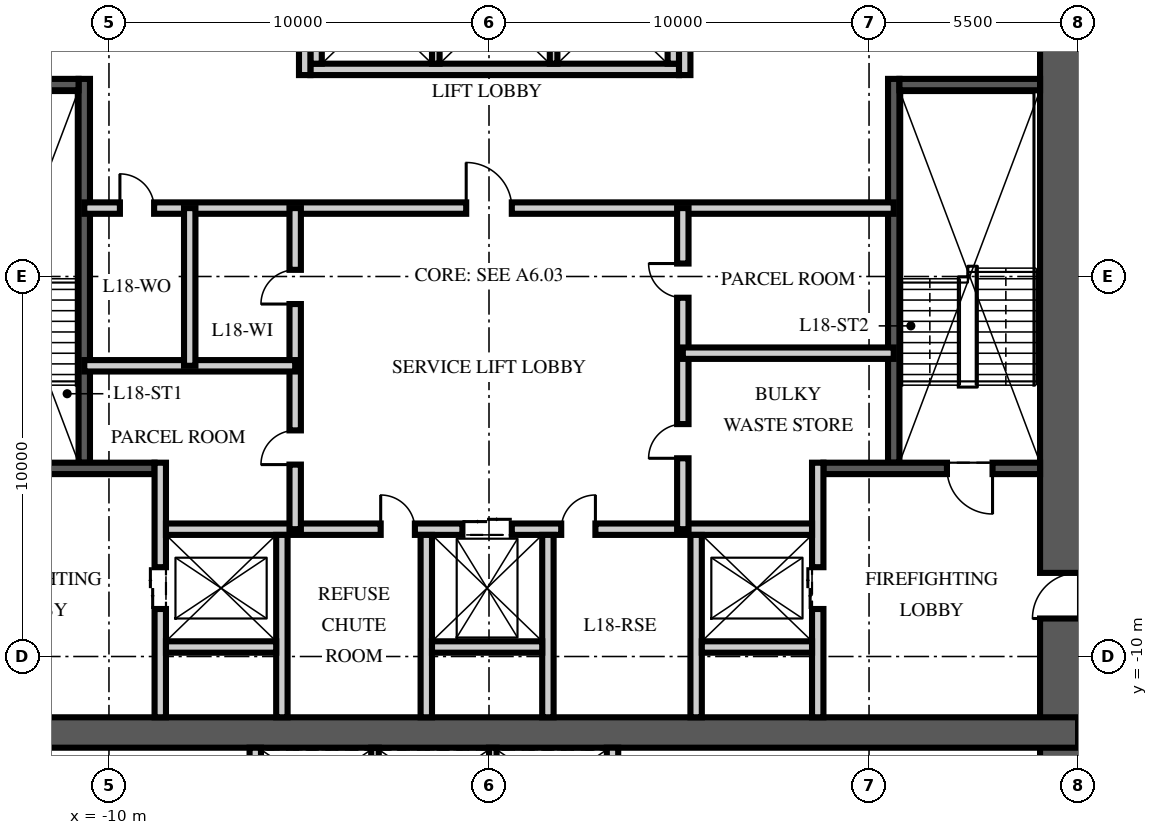
"""IFC4 building model, lengths in metres.
Left out: names, types, materials, properties, quantities, classifications, styles, units other than length and angle.
Written with IfcOpenShell. Run it as: python <this file> out.ifc"""

import sys

from ifc_helpers import new_model, si_unit, direction, frame, frame_2d, origin, place, context, subcontext, project, spatial, rectangle, extrude, element, fill, save


model = new_model("IFC4")
c1 = context("Model", 3, precision=1e-05, world=origin(), true_north=direction((0.0, 1.0)))
c2 = subcontext(c1, "Body", "Model", "MODEL_VIEW")
j1 = project(units=[si_unit("LENGTHUNIT", "METRE"), si_unit("PLANEANGLEUNIT", "RADIAN")], contexts=[c1])
p1 = place(None, origin())
s1 = spatial("IfcSite", under=j1, at=p1, CompositionType="ELEMENT")
p2 = place(p1, origin())
s2 = spatial("IfcBuilding", under=s1, at=p2, CompositionType="ELEMENT")
p3 = place(p2, frame((0.0, 0.0, 73.5)))
s3 = spatial("IfcBuildingStorey", under=s2, at=p3, CompositionType="ELEMENT", Elevation=73.5)
p4 = place(p3, frame((15.5, -15.5, -0.25), z_axis=(0.0, 0.0, 1.0), x_axis=(0.0, 1.0, 0.0)))
e1 = element("IfcWall", 1, at=p4, inside=s3, PredefinedType="SHEAR", context=c2, shape_type="SweptSolid", body=[
    extrude(rectangle(XDim=31.0, YDim=2.0, at=frame_2d((15.5, 0.0))), origin(), (0.0, 0.0, 1.0), 3.75),
])
p5 = place(p4, frame((6.5, 0.0, 0.25)))
e2 = element("IfcOpeningElement", 2, at=p5, cuts=e1, PredefinedType="OPENING", context=c2, shape_type="SweptSolid", body=[
    extrude(rectangle(XDim=1.2, YDim=2.1, at=frame_2d((0.6, 1.05))), frame((0.0, 1.01, 0.0), z_axis=(0.0, -1.0, 0.0), x_axis=(1.0, 0.0, 0.0)), (0.0, 0.0, 1.0), 2.02),
])
p6 = place(p4, frame((23.0, 0.0, 0.25)))
e3 = element("IfcOpeningElement", 3, at=p6, cuts=e1, PredefinedType="OPENING", context=c2, shape_type="SweptSolid", body=[
    extrude(rectangle(XDim=1.8, YDim=2.1, at=frame_2d((0.9, 1.05))), frame((0.0, 1.01, 0.0), z_axis=(0.0, -1.0, 0.0), x_axis=(1.0, 0.0, 0.0)), (0.0, 0.0, 1.0), 2.02),
])
p7 = place(p3, frame((-15.5, -12.0, -0.25), z_axis=(0.0, 0.0, 1.0), x_axis=(1.0, 0.0, 0.0)))
e4 = element("IfcWall", 4, at=p7, inside=s3, PredefinedType="SHEAR", context=c2, shape_type="SweptSolid", body=[
    extrude(rectangle(XDim=31.0, YDim=0.8, at=frame_2d((15.5, 0.0))), origin(), (0.0, 0.0, 1.0), 3.75),
])
p8 = place(p3, frame((-10.65, -4.9, 0.0), z_axis=(0.0, 0.0, 1.0), x_axis=(0.0, 1.0, 0.0)))
e5 = element("IfcWall", 5, at=p8, inside=s3, PredefinedType="SOLIDWALL", context=c2, shape_type="SweptSolid", body=[
    extrude(rectangle(XDim=10.1, YDim=0.3, at=frame_2d((5.05, 0.0))), origin(), (0.0, 0.0, 1.0), 3.5),
])
p9 = place(p3, frame((-14.5, -5.05, 0.0), z_axis=(0.0, 0.0, 1.0), x_axis=(1.0, 0.0, 0.0)))
e6 = element("IfcWall", 6, at=p9, inside=s3, PredefinedType="SOLIDWALL", context=c2, shape_type="SweptSolid", body=[
    extrude(rectangle(XDim=5.7, YDim=0.3, at=frame_2d((2.85, 0.0))), origin(), (0.0, 0.0, 1.0), 3.5),
])
p10 = place(p9, frame((1.25, 0.0, 0.0)))
e7 = element("IfcOpeningElement", 7, at=p10, cuts=e6, PredefinedType="OPENING", context=c2, shape_type="SweptSolid", body=[
    extrude(rectangle(XDim=1.2, YDim=2.1, at=frame_2d((0.6, 1.05))), frame((0.0, 0.16, 0.0), z_axis=(0.0, -1.0, 0.0), x_axis=(1.0, 0.0, 0.0)), (0.0, 0.0, 1.0), 0.32),
])
p11 = place(p3, frame((-14.5, 5.05, 0.0), z_axis=(0.0, 0.0, 1.0), x_axis=(1.0, 0.0, 0.0)))
e8 = element("IfcWall", 8, at=p11, inside=s3, PredefinedType="SOLIDWALL", context=c2, shape_type="SweptSolid", body=[
    extrude(rectangle(XDim=3.7, YDim=0.3, at=frame_2d((1.85, 0.0))), origin(), (0.0, 0.0, 1.0), 3.5),
])
p12 = place(p3, frame((-8.65, -11.6, 0.0), z_axis=(0.0, 0.0, 1.0), x_axis=(0.0, 1.0, 0.0)))
e9 = element("IfcWall", 9, at=p12, inside=s3, PredefinedType="PARTITIONING", context=c2, shape_type="SweptSolid", body=[
    extrude(rectangle(XDim=6.7, YDim=0.3, at=frame_2d((3.35, 0.0))), origin(), (0.0, 0.0, 1.0), 3.5),
])
p13 = place(p12, frame((2.85, 0.0, 0.0)))
e10 = element("IfcOpeningElement", 10, at=p13, cuts=e9, PredefinedType="OPENING", context=c2, shape_type="SweptSolid", body=[
    extrude(rectangle(XDim=1.1, YDim=2.1, at=frame_2d((0.55, 1.05))), frame((0.0, 0.16, 0.0), z_axis=(0.0, -1.0, 0.0), x_axis=(1.0, 0.0, 0.0)), (0.0, 0.0, 1.0), 0.32),
])
p14 = place(p3, frame((10.65, -4.9, 0.0), z_axis=(0.0, 0.0, 1.0), x_axis=(0.0, 1.0, 0.0)))
e11 = element("IfcWall", 11, at=p14, inside=s3, PredefinedType="SOLIDWALL", context=c2, shape_type="SweptSolid", body=[
    extrude(rectangle(XDim=10.1, YDim=0.3, at=frame_2d((5.05, 0.0))), origin(), (0.0, 0.0, 1.0), 3.5),
])
p15 = place(p3, frame((14.5, -5.05, 0.0), z_axis=(0.0, 0.0, 1.0), x_axis=(-1.0, 0.0, 0.0)))
e12 = element("IfcWall", 12, at=p15, inside=s3, PredefinedType="SOLIDWALL", context=c2, shape_type="SweptSolid", body=[
    extrude(rectangle(XDim=5.7, YDim=0.3, at=frame_2d((2.85, 0.0))), origin(), (0.0, 0.0, 1.0), 3.5),
])
p16 = place(p15, frame((1.25, 0.0, 0.0)))
e13 = element("IfcOpeningElement", 13, at=p16, cuts=e12, PredefinedType="OPENING", context=c2, shape_type="SweptSolid", body=[
    extrude(rectangle(XDim=1.2, YDim=2.1, at=frame_2d((0.6, 1.05))), frame((0.0, 0.16, 0.0), z_axis=(0.0, -1.0, 0.0), x_axis=(1.0, 0.0, 0.0)), (0.0, 0.0, 1.0), 0.32),
])
p17 = place(p3, frame((14.5, 5.05, 0.0), z_axis=(0.0, 0.0, 1.0), x_axis=(-1.0, 0.0, 0.0)))
e14 = element("IfcWall", 14, at=p17, inside=s3, PredefinedType="SOLIDWALL", context=c2, shape_type="SweptSolid", body=[
    extrude(rectangle(XDim=3.7, YDim=0.3, at=frame_2d((1.85, 0.0))), origin(), (0.0, 0.0, 1.0), 3.5),
])
p18 = place(p3, frame((8.65, -11.6, 0.0), z_axis=(0.0, 0.0, 1.0), x_axis=(0.0, 1.0, 0.0)))
e15 = element("IfcWall", 15, at=p18, inside=s3, PredefinedType="PARTITIONING", context=c2, shape_type="SweptSolid", body=[
    extrude(rectangle(XDim=6.7, YDim=0.3, at=frame_2d((3.35, 0.0))), origin(), (0.0, 0.0, 1.0), 3.5),
])
p19 = place(p18, frame((2.85, 0.0, 0.0)))
e16 = element("IfcOpeningElement", 16, at=p19, cuts=e15, PredefinedType="OPENING", context=c2, shape_type="SweptSolid", body=[
    extrude(rectangle(XDim=1.1, YDim=2.1, at=frame_2d((0.55, 1.05))), frame((0.0, 0.16, 0.0), z_axis=(0.0, -1.0, 0.0), x_axis=(1.0, 0.0, 0.0)), (0.0, 0.0, 1.0), 0.32),
])
p20 = place(p3, frame((-8.5, -6.65, 0.0), z_axis=(0.0, 0.0, 1.0), x_axis=(1.0, 0.0, 0.0)))
e17 = element("IfcWall", 17, at=p20, inside=s3, PredefinedType="PARTITIONING", context=c2, shape_type="SweptSolid", body=[
    extrude(rectangle(XDim=17.0, YDim=0.3, at=frame_2d((8.5, 0.0))), origin(), (0.0, 0.0, 1.0), 3.5),
])
p21 = place(p20, frame((7.8, 0.0, 0.0)))
e18 = element("IfcOpeningElement", 18, at=p21, cuts=e17, PredefinedType="OPENING", context=c2, shape_type="SweptSolid", body=[
    extrude(rectangle(XDim=1.3, YDim=2.4, at=frame_2d((0.65, 1.2))), frame((0.0, 0.16, 0.0), z_axis=(0.0, -1.0, 0.0), x_axis=(1.0, 0.0, 0.0)), (0.0, 0.0, 1.0), 0.32),
])
p22 = place(p20, frame((5.65, 0.0, 0.0)))
e19 = element("IfcOpeningElement", 19, at=p22, cuts=e17, PredefinedType="OPENING", context=c2, shape_type="SweptSolid", body=[
    extrude(rectangle(XDim=0.9, YDim=2.1, at=frame_2d((0.45, 1.05))), frame((0.0, 0.16, 0.0), z_axis=(0.0, -1.0, 0.0), x_axis=(1.0, 0.0, 0.0)), (0.0, 0.0, 1.0), 0.32),
])
p23 = place(p20, frame((10.4, 0.0, 0.0)))
e20 = element("IfcOpeningElement", 20, at=p23, cuts=e17, PredefinedType="OPENING", context=c2, shape_type="SweptSolid", body=[
    extrude(rectangle(XDim=0.9, YDim=2.1, at=frame_2d((0.45, 1.05))), frame((0.0, 0.16, 0.0), z_axis=(0.0, -1.0, 0.0), x_axis=(1.0, 0.0, 0.0)), (0.0, 0.0, 1.0), 0.32),
])
for number, where, z_axis, x_axis in (
    (21, (-5.45, -11.6, 0.0), (0.0, 0.0, 1.0), (0.0, 1.0, 0.0)),
    (22, (-1.65, -11.6, 0.0), (0.0, 0.0, 1.0), (0.0, 1.0, 0.0)),
    (23, (1.55, -11.6, 0.0), (0.0, 0.0, 1.0), (0.0, 1.0, 0.0)),
    (24, (5.45, -11.6, 0.0), (0.0, 0.0, 1.0), (0.0, 1.0, 0.0)),
):
    element("IfcWall", number, at=place(p3, frame(where, z_axis=z_axis, x_axis=x_axis)), inside=s3, PredefinedType="PARTITIONING", context=c2, shape_type="SweptSolid", body=[
        extrude(rectangle(XDim=4.8, YDim=0.3, at=frame_2d((2.4, 0.0))), origin(), (0.0, 0.0, 1.0), 3.5),
    ])
for number, where, z_axis, x_axis in (
    (25, (-8.5, -9.75, 0.0), (0.0, 0.0, 1.0), (1.0, 0.0, 0.0)),
    (26, (-1.5, -9.75, 0.0), (0.0, 0.0, 1.0), (1.0, 0.0, 0.0)),
    (27, (5.6, -9.75, 0.0), (0.0, 0.0, 1.0), (1.0, 0.0, 0.0)),
):
    element("IfcWall", number, at=place(p3, frame(where, z_axis=z_axis, x_axis=x_axis)), inside=s3, PredefinedType="PARTITIONING", context=c2, shape_type="SweptSolid", body=[
        extrude(rectangle(XDim=2.9, YDim=0.3, at=frame_2d((1.45, 0.0))), origin(), (0.0, 0.0, 1.0), 3.5),
    ])
p24 = place(p3, frame((-4.7, 5.45, 0.0), z_axis=(0.0, 0.0, 1.0), x_axis=(1.0, 0.0, 0.0)))
e28 = element("IfcWall", 28, at=p24, inside=s3, PredefinedType="PARTITIONING", context=c2, shape_type="SweptSolid", body=[
    extrude(rectangle(XDim=9.7, YDim=0.3, at=frame_2d((4.85, 0.0))), origin(), (0.0, 0.0, 1.0), 3.5),
])
for number, where, z_axis, x_axis in (
    (29, (-4.55, 5.6, 0.0), (0.0, 0.0, 1.0), (0.0, 1.0, 0.0)),
    (30, (4.85, 5.6, 0.0), (0.0, 0.0, 1.0), (0.0, 1.0, 0.0)),
):
    element("IfcWall", number, at=place(p3, frame(where, z_axis=z_axis, x_axis=x_axis)), inside=s3, PredefinedType="PARTITIONING", context=c2, shape_type="SweptSolid", body=[
        extrude(rectangle(XDim=2.8, YDim=0.3, at=frame_2d((1.4, 0.0))), origin(), (0.0, 0.0, 1.0), 3.5),
    ])
for number, where, z_axis, x_axis in (
    (31, (-1.4, 5.6, 0.0), (0.0, 0.0, 1.0), (0.0, 1.0, 0.0)),
    (32, (1.7, 5.6, 0.0), (0.0, 0.0, 1.0), (0.0, 1.0, 0.0)),
):
    element("IfcWall", number, at=place(p3, frame(where, z_axis=z_axis, x_axis=x_axis)), inside=s3, PredefinedType="PARTITIONING", context=c2, shape_type="SweptSolid", body=[
        extrude(rectangle(XDim=2.8, YDim=0.2, at=frame_2d((1.4, 0.0))), origin(), (0.0, 0.0, 1.0), 3.5),
    ])
for number, where, z_axis, x_axis in (
    (33, (-6.15, -14.5, 0.0), (0.0, 0.0, 1.0), (0.0, 1.0, 0.0)),
    (34, (3.25, -14.5, 0.0), (0.0, 0.0, 1.0), (0.0, 1.0, 0.0)),
):
    element("IfcWall", number, at=place(p3, frame(where, z_axis=z_axis, x_axis=x_axis)), inside=s3, PredefinedType="PARTITIONING", context=c2, shape_type="SweptSolid", body=[
        extrude(rectangle(XDim=2.1, YDim=0.3, at=frame_2d((1.05, 0.0))), origin(), (0.0, 0.0, 1.0), 3.5),
    ])
for number, where, z_axis, x_axis in (
    (35, (-3.0, -14.5, 0.0), (0.0, 0.0, 1.0), (0.0, 1.0, 0.0)),
    (36, (0.1, -14.5, 0.0), (0.0, 0.0, 1.0), (0.0, 1.0, 0.0)),
):
    element("IfcWall", number, at=place(p3, frame(where, z_axis=z_axis, x_axis=x_axis)), inside=s3, PredefinedType="PARTITIONING", context=c2, shape_type="SweptSolid", body=[
        extrude(rectangle(XDim=2.1, YDim=0.2, at=frame_2d((1.05, 0.0))), origin(), (0.0, 0.0, 1.0), 3.5),
    ])
p25 = place(p3, frame((-10.65, 1.8, 0.0), z_axis=(0.0, 0.0, 1.0), x_axis=(1.0, 0.0, 0.0)))
e37 = element("IfcWall", 37, at=p25, inside=s3, PredefinedType="PARTITIONING", context=c2, shape_type="SweptSolid", body=[
    extrude(rectangle(XDim=21.3, YDim=0.3, at=frame_2d((10.65, 0.0))), origin(), (0.0, 0.0, 1.0), 3.5),
])
p26 = place(p25, frame((10.05, 0.0, 0.0)))
e38 = element("IfcOpeningElement", 38, at=p26, cuts=e37, PredefinedType="OPENING", context=c2, shape_type="SweptSolid", body=[
    extrude(rectangle(XDim=1.2, YDim=2.1, at=frame_2d((0.6, 1.05))), frame((0.0, 0.16, 0.0), z_axis=(0.0, -1.0, 0.0), x_axis=(1.0, 0.0, 0.0)), (0.0, 0.0, 1.0), 0.32),
])
p27 = place(p25, frame((0.938, 0.0, 0.0)))
e39 = element("IfcOpeningElement", 39, at=p27, cuts=e37, PredefinedType="OPENING", context=c2, shape_type="SweptSolid", body=[
    extrude(rectangle(XDim=0.9, YDim=2.1, at=frame_2d((0.45, 1.05))), frame((0.0, 0.16, 0.0), z_axis=(0.0, -1.0, 0.0), x_axis=(1.0, 0.0, 0.0)), (0.0, 0.0, 1.0), 0.32),
])
p28 = place(p3, frame((-5.1, -6.65, 0.0), z_axis=(0.0, 0.0, 1.0), x_axis=(0.0, 1.0, 0.0)))
e40 = element("IfcWall", 40, at=p28, inside=s3, PredefinedType="PARTITIONING", context=c2, shape_type="SweptSolid", body=[
    extrude(rectangle(XDim=8.45, YDim=0.3, at=frame_2d((4.225, 0.0))), origin(), (0.0, 0.0, 1.0), 3.5),
])
p29 = place(p28, frame((1.7, 0.0, 0.0)))
e41 = element("IfcOpeningElement", 41, at=p29, cuts=e40, PredefinedType="OPENING", context=c2, shape_type="SweptSolid", body=[
    extrude(rectangle(XDim=0.9, YDim=2.1, at=frame_2d((0.45, 1.05))), frame((0.0, 0.16, 0.0), z_axis=(0.0, -1.0, 0.0), x_axis=(1.0, 0.0, 0.0)), (0.0, 0.0, 1.0), 0.32),
])
p30 = place(p28, frame((5.925, 0.0, 0.0)))
e42 = element("IfcOpeningElement", 42, at=p30, cuts=e40, PredefinedType="OPENING", context=c2, shape_type="SweptSolid", body=[
    extrude(rectangle(XDim=0.9, YDim=2.1, at=frame_2d((0.45, 1.05))), frame((0.0, 0.16, 0.0), z_axis=(0.0, -1.0, 0.0), x_axis=(1.0, 0.0, 0.0)), (0.0, 0.0, 1.0), 0.32),
])
p31 = place(p3, frame((5.1, -6.65, 0.0), z_axis=(0.0, 0.0, 1.0), x_axis=(0.0, 1.0, 0.0)))
e43 = element("IfcWall", 43, at=p31, inside=s3, PredefinedType="PARTITIONING", context=c2, shape_type="SweptSolid", body=[
    extrude(rectangle(XDim=8.45, YDim=0.3, at=frame_2d((4.225, 0.0))), origin(), (0.0, 0.0, 1.0), 3.5),
])
p32 = place(p31, frame((1.866, 0.0, 0.0)))
e44 = element("IfcOpeningElement", 44, at=p32, cuts=e43, PredefinedType="OPENING", context=c2, shape_type="SweptSolid", body=[
    extrude(rectangle(XDim=0.9, YDim=2.1, at=frame_2d((0.45, 1.05))), frame((0.0, 0.16, 0.0), z_axis=(0.0, -1.0, 0.0), x_axis=(1.0, 0.0, 0.0)), (0.0, 0.0, 1.0), 0.32),
])
p33 = place(p31, frame((6.091, 0.0, 0.0)))
e45 = element("IfcOpeningElement", 45, at=p33, cuts=e43, PredefinedType="OPENING", context=c2, shape_type="SweptSolid", body=[
    extrude(rectangle(XDim=0.9, YDim=2.1, at=frame_2d((0.45, 1.05))), frame((0.0, 0.16, 0.0), z_axis=(0.0, -1.0, 0.0), x_axis=(1.0, 0.0, 0.0)), (0.0, 0.0, 1.0), 0.32),
])
p34 = place(p3, frame((-10.65, -2.35, 0.0), z_axis=(0.0, 0.0, 1.0), x_axis=(1.0, 0.0, 0.0)))
e46 = element("IfcWall", 46, at=p34, inside=s3, PredefinedType="PARTITIONING", context=c2, shape_type="SweptSolid", body=[
    extrude(rectangle(XDim=5.55, YDim=0.3, at=frame_2d((2.775, 0.0))), origin(), (0.0, 0.0, 1.0), 3.5),
])
p35 = place(p3, frame((-7.875, -2.35, 0.0), z_axis=(0.0, 0.0, 1.0), x_axis=(0.0, 1.0, 0.0)))
e47 = element("IfcWall", 47, at=p35, inside=s3, PredefinedType="PARTITIONING", context=c2, shape_type="SweptSolid", body=[
    extrude(rectangle(XDim=4.15, YDim=0.3, at=frame_2d((2.075, 0.0))), origin(), (0.0, 0.0, 1.0), 3.5),
])
p36 = place(p3, frame((10.65, -2.018, 0.0), z_axis=(0.0, 0.0, 1.0), x_axis=(-1.0, 0.0, 0.0)))
e48 = element("IfcWall", 48, at=p36, inside=s3, PredefinedType="PARTITIONING", context=c2, shape_type="SweptSolid", body=[
    extrude(rectangle(XDim=5.55, YDim=0.3, at=frame_2d((2.775, 0.0))), origin(), (0.0, 0.0, 1.0), 3.5),
])
p37 = place(p3, frame((-4.85, 5.3, 0.0), z_axis=(0.0, 0.0, 1.0), x_axis=(0.0, 1.0, 0.0)))
e49 = element("IfcWall", 49, at=p37, inside=s3, PredefinedType="PARTITIONING", context=c2, shape_type="SweptSolid", body=[
    extrude(rectangle(XDim=6.3, YDim=0.3, at=frame_2d((3.15, 0.0))), origin(), (0.0, 0.0, 1.0), 3.5),
])
p38 = place(p37, frame((4.35, 0.0, 0.0)))
e50 = element("IfcOpeningElement", 50, at=p38, cuts=e49, PredefinedType="OPENING", context=c2, shape_type="SweptSolid", body=[
    extrude(rectangle(XDim=0.9, YDim=2.1, at=frame_2d((0.45, 1.05))), frame((0.0, 0.16, 0.0), z_axis=(0.0, -1.0, 0.0), x_axis=(1.0, 0.0, 0.0)), (0.0, 0.0, 1.0), 0.32),
])
p39 = place(p3, frame((5.15, 5.3, 0.0), z_axis=(0.0, 0.0, 1.0), x_axis=(0.0, 1.0, 0.0)))
e51 = element("IfcWall", 51, at=p39, inside=s3, PredefinedType="PARTITIONING", context=c2, shape_type="SweptSolid", body=[
    extrude(rectangle(XDim=6.3, YDim=0.3, at=frame_2d((3.15, 0.0))), origin(), (0.0, 0.0, 1.0), 3.5),
])
p40 = place(p16, origin())
e52 = element("IfcDoor", 52, at=p40, inside=s3, OperationType="SINGLE_SWING_LEFT", PredefinedType="DOOR", context=c2, shape_type="SweptSolid", body=[
    extrude(rectangle(XDim=1.2, YDim=2.1, at=frame_2d((0.6, 1.05))), frame((0.0, 0.025, 0.0), z_axis=(0.0, -1.0, 0.0), x_axis=(1.0, 0.0, 0.0)), (0.0, 0.0, 1.0), 0.05),
])
fill(e13, e52)
p41 = place(p5, origin())
e53 = element("IfcDoor", 53, at=p41, inside=s3, OperationType="SINGLE_SWING_LEFT", PredefinedType="DOOR", context=c2, shape_type="SweptSolid", body=[
    extrude(rectangle(XDim=1.2, YDim=2.1, at=frame_2d((0.6, 1.05))), frame((0.0, 0.025, 0.0), z_axis=(0.0, -1.0, 0.0), x_axis=(1.0, 0.0, 0.0)), (0.0, 0.0, 1.0), 0.05),
])
fill(e2, e53)
p42 = place(p13, origin())
e54 = element("IfcDoor", 54, at=p42, inside=s3, OperationType="DOUBLE_DOOR_SLIDING", PredefinedType="DOOR", context=c2, shape_type="SweptSolid", body=[
    extrude(rectangle(XDim=1.1, YDim=2.1, at=frame_2d((0.55, 1.05))), frame((0.0, 0.025, 0.0), z_axis=(0.0, -1.0, 0.0), x_axis=(1.0, 0.0, 0.0)), (0.0, 0.0, 1.0), 0.05),
])
fill(e10, e54)
p43 = place(p19, origin())
e55 = element("IfcDoor", 55, at=p43, inside=s3, OperationType="DOUBLE_DOOR_SLIDING", PredefinedType="DOOR", context=c2, shape_type="SweptSolid", body=[
    extrude(rectangle(XDim=1.1, YDim=2.1, at=frame_2d((0.55, 1.05))), frame((0.0, 0.025, 0.0), z_axis=(0.0, -1.0, 0.0), x_axis=(1.0, 0.0, 0.0)), (0.0, 0.0, 1.0), 0.05),
])
fill(e16, e55)
p44 = place(p21, origin())
e56 = element("IfcDoor", 56, at=p44, inside=s3, OperationType="DOUBLE_DOOR_SLIDING", PredefinedType="DOOR", context=c2, shape_type="SweptSolid", body=[
    extrude(rectangle(XDim=1.3, YDim=2.4, at=frame_2d((0.65, 1.2))), frame((0.0, 0.025, 0.0), z_axis=(0.0, -1.0, 0.0), x_axis=(1.0, 0.0, 0.0)), (0.0, 0.0, 1.0), 0.05),
])
fill(e18, e56)
p45 = place(p26, origin())
e57 = element("IfcDoor", 57, at=p45, inside=s3, OperationType="SINGLE_SWING_LEFT", PredefinedType="DOOR", context=c2, shape_type="SweptSolid", body=[
    extrude(rectangle(XDim=1.2, YDim=2.1, at=frame_2d((0.6, 1.05))), frame((0.0, 0.025, 0.0), z_axis=(0.0, -1.0, 0.0), x_axis=(1.0, 0.0, 0.0)), (0.0, 0.0, 1.0), 0.05),
])
fill(e38, e57)
p46 = place(p22, origin())
e58 = element("IfcDoor", 58, at=p46, inside=s3, OperationType="SINGLE_SWING_LEFT", PredefinedType="DOOR", context=c2, shape_type="SweptSolid", body=[
    extrude(rectangle(XDim=0.9, YDim=2.1, at=frame_2d((0.45, 1.05))), frame((0.0, 0.025, 0.0), z_axis=(0.0, -1.0, 0.0), x_axis=(1.0, 0.0, 0.0)), (0.0, 0.0, 1.0), 0.05),
])
fill(e19, e58)
p47 = place(p23, origin())
e59 = element("IfcDoor", 59, at=p47, inside=s3, OperationType="SINGLE_SWING_RIGHT", PredefinedType="DOOR", context=c2, shape_type="SweptSolid", body=[
    extrude(rectangle(XDim=0.9, YDim=2.1, at=frame_2d((0.45, 1.05))), frame((0.0, 0.025, 0.0), z_axis=(0.0, -1.0, 0.0), x_axis=(1.0, 0.0, 0.0)), (0.0, 0.0, 1.0), 0.05),
])
fill(e20, e59)
p48 = place(p29, origin())
e60 = element("IfcDoor", 60, at=p48, inside=s3, OperationType="SINGLE_SWING_LEFT", PredefinedType="DOOR", context=c2, shape_type="SweptSolid", body=[
    extrude(rectangle(XDim=0.9, YDim=2.1, at=frame_2d((0.45, 1.05))), frame((0.0, 0.025, 0.0), z_axis=(0.0, -1.0, 0.0), x_axis=(1.0, 0.0, 0.0)), (0.0, 0.0, 1.0), 0.05),
])
fill(e41, e60)
p49 = place(p30, origin())
e61 = element("IfcDoor", 61, at=p49, inside=s3, OperationType="SINGLE_SWING_LEFT", PredefinedType="DOOR", context=c2, shape_type="SweptSolid", body=[
    extrude(rectangle(XDim=0.9, YDim=2.1, at=frame_2d((0.45, 1.05))), frame((0.0, 0.025, 0.0), z_axis=(0.0, -1.0, 0.0), x_axis=(1.0, 0.0, 0.0)), (0.0, 0.0, 1.0), 0.05),
])
fill(e42, e61)
p50 = place(p27, origin())
e62 = element("IfcDoor", 62, at=p50, inside=s3, OperationType="SINGLE_SWING_LEFT", PredefinedType="DOOR", context=c2, shape_type="SweptSolid", body=[
    extrude(rectangle(XDim=0.9, YDim=2.1, at=frame_2d((0.45, 1.05))), frame((0.0, 0.025, 0.0), z_axis=(0.0, -1.0, 0.0), x_axis=(1.0, 0.0, 0.0)), (0.0, 0.0, 1.0), 0.05),
])
fill(e39, e62)
p51 = place(p32, origin())
e63 = element("IfcDoor", 63, at=p51, inside=s3, OperationType="SINGLE_SWING_LEFT", PredefinedType="DOOR", context=c2, shape_type="SweptSolid", body=[
    extrude(rectangle(XDim=0.9, YDim=2.1, at=frame_2d((0.45, 1.05))), frame((0.0, 0.025, 0.0), z_axis=(0.0, -1.0, 0.0), x_axis=(1.0, 0.0, 0.0)), (0.0, 0.0, 1.0), 0.05),
])
fill(e44, e63)
p52 = place(p33, origin())
e64 = element("IfcDoor", 64, at=p52, inside=s3, OperationType="SINGLE_SWING_RIGHT", PredefinedType="DOOR", context=c2, shape_type="SweptSolid", body=[
    extrude(rectangle(XDim=0.9, YDim=2.1, at=frame_2d((0.45, 1.05))), frame((0.0, 0.025, 0.0), z_axis=(0.0, -1.0, 0.0), x_axis=(1.0, 0.0, 0.0)), (0.0, 0.0, 1.0), 0.05),
])
fill(e45, e64)
save(model, sys.argv[1])
